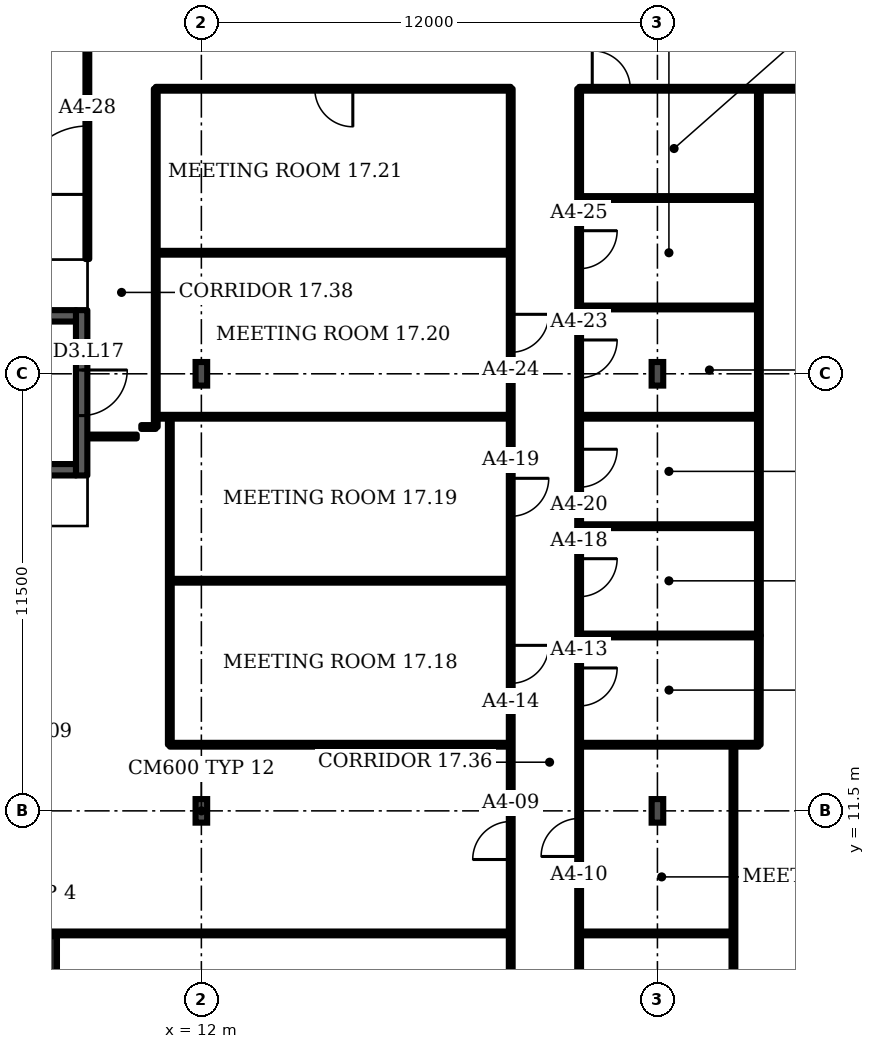
"""IFC4 building model, lengths in metres.
Left out: names, types, materials, properties, quantities, classifications, styles, units other than length and angle.
Written with IfcOpenShell. Run it as: python <this file> out.ifc"""

import sys

from ifc_helpers import new_model, si_unit, direction, frame, frame_2d, origin, origin_2d, place, context, subcontext, project, spatial, rectangle, i_section, extrude, element, fill, save


model = new_model("IFC4")
c1 = context("Model", 3, precision=1e-05, world=origin(), true_north=direction((0.0, 1.0)))
c2 = subcontext(c1, "Body", "Model", "MODEL_VIEW")
j1 = project(units=[si_unit("LENGTHUNIT", "METRE"), si_unit("PLANEANGLEUNIT", "RADIAN")], contexts=[c1])
p1 = place(None, origin())
s1 = spatial("IfcSite", under=j1, at=p1, CompositionType="ELEMENT")
p2 = place(p1, origin())
s2 = spatial("IfcBuilding", under=s1, at=p2, CompositionType="ELEMENT")
p3 = place(p2, frame((0.0, 0.0, 81.1)))
s3 = spatial("IfcBuildingStorey", under=s2, at=p3, CompositionType="ELEMENT", Elevation=81.1)
p4 = place(p3, frame((7.1, 7.1, 0.0), z_axis=(0.0, 0.0, 1.0), x_axis=(1.0, 0.0, 0.0)))
e1 = element("IfcColumn", 1, at=p4, inside=s3, PredefinedType="COLUMN", context=c2, shape_type="SweptSolid", body=[
    extrude(rectangle(XDim=2.2, YDim=2.2, at=origin_2d()), origin(), (0.0, 0.0, 1.0), 3.6),
])
for number, where, z_axis, x_axis in (
    (2, (12.0, 11.5, 0.0), (0.0, 0.0, 1.0), (1.0, 0.0, 0.0)),
    (3, (24.0, 11.5, 0.0), (0.0, 0.0, 1.0), (1.0, 0.0, 0.0)),
    (4, (12.0, 23.0, 0.0), (0.0, 0.0, 1.0), (1.0, 0.0, 0.0)),
    (5, (24.0, 23.0, 0.0), (0.0, 0.0, 1.0), (1.0, 0.0, 0.0)),
):
    element("IfcColumn", number, at=place(p3, frame(where, z_axis=z_axis, x_axis=x_axis)), inside=s3, PredefinedType="COLUMN", context=c2, shape_type="SweptSolid", body=[
        extrude(i_section(OverallWidth=0.305, OverallDepth=0.62, WebThickness=0.021, FlangeThickness=0.04, FilletRadius=0.027, at=origin_2d()), origin(), (0.0, 0.0, 1.0), 3.6),
    ])
p5 = place(p3, frame((8.85, 20.325, 0.0), z_axis=(0.0, 0.0, 1.0), x_axis=(0.0, 1.0, 0.0)))
e6 = element("IfcWall", 6, at=p5, inside=s3, PredefinedType="SHEAR", context=c2, shape_type="SweptSolid", body=[
    extrude(rectangle(XDim=4.35, YDim=0.3, at=frame_2d((2.175, 0.0))), origin(), (0.0, 0.0, 1.0), 3.2),
])
p6 = place(p5, frame((1.575, 0.0, 0.0)))
e7 = element("IfcOpeningElement", 7, at=p6, cuts=e6, PredefinedType="OPENING", context=c2, shape_type="SweptSolid", body=[
    extrude(rectangle(XDim=1.2, YDim=2.1, at=frame_2d((0.6, 1.05))), frame((0.0, 0.16, 0.0), z_axis=(0.0, -1.0, 0.0), x_axis=(1.0, 0.0, 0.0)), (0.0, 0.0, 1.0), 0.32),
])
p7 = place(p3, frame((6.0, 8.275, 0.0), z_axis=(0.0, 0.0, 1.0), x_axis=(1.0, 0.0, 0.0)))
e8 = element("IfcWall", 8, at=p7, inside=s3, PredefinedType="PARTITIONING", context=c2, shape_type="SweptSolid", body=[
    extrude(rectangle(XDim=14.14, YDim=0.1, at=frame_2d((7.07, 0.0))), origin(), (0.0, 0.0, 1.0), 3.2),
])
p8 = place(p3, frame((9.0, 26.02, 0.0), z_axis=(0.0, 0.0, 1.0), x_axis=(0.0, 1.0, 0.0)))
e9 = element("IfcWall", 9, at=p8, inside=s3, PredefinedType="PARTITIONING", context=c2, shape_type="SweptSolid", body=[
    extrude(rectangle(XDim=7.96, YDim=0.1, at=frame_2d((3.98, 0.0))), origin(), (0.0, 0.0, 1.0), 3.2),
])
p9 = place(p8, frame((1.7, 0.0, 0.0)))
e10 = element("IfcOpeningElement", 10, at=p9, cuts=e9, PredefinedType="OPENING", context=c2, shape_type="SweptSolid", body=[
    extrude(rectangle(XDim=1.8, YDim=2.1, at=frame_2d((0.9, 1.05))), frame((0.0, 0.06, 0.0), z_axis=(0.0, -1.0, 0.0), x_axis=(1.0, 0.0, 0.0)), (0.0, 0.0, 1.0), 0.12),
])
p10 = place(p3, frame((9.02, 21.35, 0.0), z_axis=(0.0, 0.0, 1.0), x_axis=(1.0, 0.0, 0.0)))
e11 = element("IfcWall", 11, at=p10, inside=s3, PredefinedType="PARTITIONING", context=c2, shape_type="SweptSolid", body=[
    extrude(rectangle(XDim=1.28, YDim=0.1, at=frame_2d((0.64, 0.0))), origin(), (0.0, 0.0, 1.0), 3.2),
])
p11 = place(p3, frame((10.42, 21.6, 0.0), z_axis=(0.0, 0.0, 1.0), x_axis=(1.0, 0.0, 0.0)))
e12 = element("IfcWall", 12, at=p11, inside=s3, PredefinedType="PARTITIONING", context=c2, shape_type="SweptSolid", body=[
    extrude(rectangle(XDim=0.38, YDim=0.1, at=frame_2d((0.19, 0.0))), origin(), (0.0, 0.0, 1.0), 3.2),
])
p12 = place(p3, frame((10.8, 21.6, 0.0), z_axis=(0.0, 0.0, 1.0), x_axis=(0.0, 1.0, 0.0)))
e13 = element("IfcWall", 13, at=p12, inside=s3, PredefinedType="PARTITIONING", context=c2, shape_type="SweptSolid", body=[
    extrude(rectangle(XDim=8.9, YDim=0.1, at=frame_2d((4.45, 0.0))), origin(), (0.0, 0.0, 1.0), 3.2),
])
for number, where, z_axis, x_axis in (
    (14, (10.8, 21.87, 0.0), (0.0, 0.0, 1.0), (1.0, 0.0, 0.0)),
    (15, (10.8, 26.185, 0.0), (0.0, 0.0, 1.0), (1.0, 0.0, 0.0)),
):
    element("IfcWall", number, at=place(p3, frame(where, z_axis=z_axis, x_axis=x_axis)), inside=s3, PredefinedType="PARTITIONING", context=c2, shape_type="SweptSolid", body=[
        extrude(rectangle(XDim=9.34, YDim=0.1, at=frame_2d((4.67, 0.0))), origin(), (0.0, 0.0, 1.0), 3.2),
    ])
p13 = place(p3, frame((10.8, 30.5, 0.0), z_axis=(0.0, 0.0, 1.0), x_axis=(1.0, 0.0, 0.0)))
e16 = element("IfcWall", 16, at=p13, inside=s3, PredefinedType="PARTITIONING", context=c2, shape_type="SweptSolid", body=[
    extrude(rectangle(XDim=9.34, YDim=0.1, at=frame_2d((4.67, 0.0))), origin(), (0.0, 0.0, 1.0), 3.2),
])
p14 = place(p13, frame((4.185, 0.0, 0.0)))
e17 = element("IfcOpeningElement", 17, at=p14, cuts=e16, PredefinedType="OPENING", context=c2, shape_type="SweptSolid", body=[
    extrude(rectangle(XDim=1.0, YDim=2.1, at=frame_2d((0.5, 1.05))), frame((0.0, 0.06, 0.0), z_axis=(0.0, -1.0, 0.0), x_axis=(1.0, 0.0, 0.0)), (0.0, 0.0, 1.0), 0.12),
])
p15 = place(p3, frame((11.17, 13.24, 0.0), z_axis=(0.0, 0.0, 1.0), x_axis=(0.0, 1.0, 0.0)))
e18 = element("IfcWall", 18, at=p15, inside=s3, PredefinedType="PARTITIONING", context=c2, shape_type="SweptSolid", body=[
    extrude(rectangle(XDim=8.63, YDim=0.1, at=frame_2d((4.315, 0.0))), origin(), (0.0, 0.0, 1.0), 3.2),
])
for number, where, z_axis, x_axis in (
    (19, (11.17, 13.24, 0.0), (0.0, 0.0, 1.0), (1.0, 0.0, 0.0)),
    (20, (11.17, 17.555, 0.0), (0.0, 0.0, 1.0), (1.0, 0.0, 0.0)),
):
    element("IfcWall", number, at=place(p3, frame(where, z_axis=z_axis, x_axis=x_axis)), inside=s3, PredefinedType="PARTITIONING", context=c2, shape_type="SweptSolid", body=[
        extrude(rectangle(XDim=8.97, YDim=0.1, at=frame_2d((4.485, 0.0))), origin(), (0.0, 0.0, 1.0), 3.2),
    ])
p16 = place(p3, frame((20.14, -1.13, 0.0), z_axis=(0.0, 0.0, 1.0), x_axis=(0.0, 1.0, 0.0)))
e21 = element("IfcWall", 21, at=p16, inside=s3, PredefinedType="PARTITIONING", context=c2, shape_type="SweptSolid", body=[
    extrude(rectangle(XDim=31.63, YDim=0.1, at=frame_2d((15.815, 0.0))), origin(), (0.0, 0.0, 1.0), 3.2),
])
p17 = place(p16, frame((1.825, 0.0, 0.0)))
e22 = element("IfcOpeningElement", 22, at=p17, cuts=e21, PredefinedType="OPENING", context=c2, shape_type="SweptSolid", body=[
    extrude(rectangle(XDim=1.0, YDim=2.1, at=frame_2d((0.5, 1.05))), frame((0.0, 0.06, 0.0), z_axis=(0.0, -1.0, 0.0), x_axis=(1.0, 0.0, 0.0)), (0.0, 0.0, 1.0), 0.12),
])
p18 = place(p16, frame((6.305, 0.0, 0.0)))
e23 = element("IfcOpeningElement", 23, at=p18, cuts=e21, PredefinedType="OPENING", context=c2, shape_type="SweptSolid", body=[
    extrude(rectangle(XDim=1.0, YDim=2.1, at=frame_2d((0.5, 1.05))), frame((0.0, 0.06, 0.0), z_axis=(0.0, -1.0, 0.0), x_axis=(1.0, 0.0, 0.0)), (0.0, 0.0, 1.0), 0.12),
])
p19 = place(p16, frame((11.35, 0.0, 0.0)))
e24 = element("IfcOpeningElement", 24, at=p19, cuts=e21, PredefinedType="OPENING", context=c2, shape_type="SweptSolid", body=[
    extrude(rectangle(XDim=1.0, YDim=2.1, at=frame_2d((0.5, 1.05))), frame((0.0, 0.06, 0.0), z_axis=(0.0, -1.0, 0.0), x_axis=(1.0, 0.0, 0.0)), (0.0, 0.0, 1.0), 0.12),
])
p20 = place(p16, frame((15.985, 0.0, 0.0)))
e25 = element("IfcOpeningElement", 25, at=p20, cuts=e21, PredefinedType="OPENING", context=c2, shape_type="SweptSolid", body=[
    extrude(rectangle(XDim=1.0, YDim=2.1, at=frame_2d((0.5, 1.05))), frame((0.0, 0.06, 0.0), z_axis=(0.0, -1.0, 0.0), x_axis=(1.0, 0.0, 0.0)), (0.0, 0.0, 1.0), 0.12),
])
p21 = place(p16, frame((20.38, 0.0, 0.0)))
e26 = element("IfcOpeningElement", 26, at=p21, cuts=e21, PredefinedType="OPENING", context=c2, shape_type="SweptSolid", body=[
    extrude(rectangle(XDim=1.0, YDim=2.1, at=frame_2d((0.5, 1.05))), frame((0.0, 0.06, 0.0), z_axis=(0.0, -1.0, 0.0), x_axis=(1.0, 0.0, 0.0)), (0.0, 0.0, 1.0), 0.12),
])
p22 = place(p16, frame((24.695, 0.0, 0.0)))
e27 = element("IfcOpeningElement", 27, at=p22, cuts=e21, PredefinedType="OPENING", context=c2, shape_type="SweptSolid", body=[
    extrude(rectangle(XDim=1.0, YDim=2.1, at=frame_2d((0.5, 1.05))), frame((0.0, 0.06, 0.0), z_axis=(0.0, -1.0, 0.0), x_axis=(1.0, 0.0, 0.0)), (0.0, 0.0, 1.0), 0.12),
])
p23 = place(p3, frame((21.94, -1.29, 0.0), z_axis=(0.0, 0.0, 1.0), x_axis=(0.0, 1.0, 0.0)))
e28 = element("IfcWall", 28, at=p23, inside=s3, PredefinedType="PARTITIONING", context=c2, shape_type="SweptSolid", body=[
    extrude(rectangle(XDim=31.79, YDim=0.1, at=frame_2d((15.895, 0.0))), origin(), (0.0, 0.0, 1.0), 3.2),
])
p24 = place(p23, frame((1.82, 0.0, 0.0)))
e29 = element("IfcOpeningElement", 29, at=p24, cuts=e28, PredefinedType="OPENING", context=c2, shape_type="SweptSolid", body=[
    extrude(rectangle(XDim=1.0, YDim=2.1, at=frame_2d((0.5, 1.05))), frame((0.0, 0.06, 0.0), z_axis=(0.0, -1.0, 0.0), x_axis=(1.0, 0.0, 0.0)), (0.0, 0.0, 1.0), 0.12),
])
p25 = place(p23, frame((6.63, 0.0, 0.0)))
e30 = element("IfcOpeningElement", 30, at=p25, cuts=e28, PredefinedType="OPENING", context=c2, shape_type="SweptSolid", body=[
    extrude(rectangle(XDim=1.0, YDim=2.1, at=frame_2d((0.5, 1.05))), frame((0.0, 0.06, 0.0), z_axis=(0.0, -1.0, 0.0), x_axis=(1.0, 0.0, 0.0)), (0.0, 0.0, 1.0), 0.12),
])
p26 = place(p23, frame((11.59, 0.0, 0.0)))
e31 = element("IfcOpeningElement", 31, at=p26, cuts=e28, PredefinedType="OPENING", context=c2, shape_type="SweptSolid", body=[
    extrude(rectangle(XDim=1.0, YDim=2.1, at=frame_2d((0.5, 1.05))), frame((0.0, 0.06, 0.0), z_axis=(0.0, -1.0, 0.0), x_axis=(1.0, 0.0, 0.0)), (0.0, 0.0, 1.0), 0.12),
])
p27 = place(p23, frame((15.55, 0.0, 0.0)))
e32 = element("IfcOpeningElement", 32, at=p27, cuts=e28, PredefinedType="OPENING", context=c2, shape_type="SweptSolid", body=[
    extrude(rectangle(XDim=1.0, YDim=2.1, at=frame_2d((0.5, 1.05))), frame((0.0, 0.06, 0.0), z_axis=(0.0, -1.0, 0.0), x_axis=(1.0, 0.0, 0.0)), (0.0, 0.0, 1.0), 0.12),
])
p28 = place(p23, frame((18.425, 0.0, 0.0)))
e33 = element("IfcOpeningElement", 33, at=p28, cuts=e28, PredefinedType="OPENING", context=c2, shape_type="SweptSolid", body=[
    extrude(rectangle(XDim=1.0, YDim=2.1, at=frame_2d((0.5, 1.05))), frame((0.0, 0.06, 0.0), z_axis=(0.0, -1.0, 0.0), x_axis=(1.0, 0.0, 0.0)), (0.0, 0.0, 1.0), 0.12),
])
p29 = place(p23, frame((21.305, 0.0, 0.0)))
e34 = element("IfcOpeningElement", 34, at=p29, cuts=e28, PredefinedType="OPENING", context=c2, shape_type="SweptSolid", body=[
    extrude(rectangle(XDim=1.0, YDim=2.1, at=frame_2d((0.5, 1.05))), frame((0.0, 0.06, 0.0), z_axis=(0.0, -1.0, 0.0), x_axis=(1.0, 0.0, 0.0)), (0.0, 0.0, 1.0), 0.12),
])
p30 = place(p23, frame((24.18, 0.0, 0.0)))
e35 = element("IfcOpeningElement", 35, at=p30, cuts=e28, PredefinedType="OPENING", context=c2, shape_type="SweptSolid", body=[
    extrude(rectangle(XDim=1.0, YDim=2.1, at=frame_2d((0.5, 1.05))), frame((0.0, 0.06, 0.0), z_axis=(0.0, -1.0, 0.0), x_axis=(1.0, 0.0, 0.0)), (0.0, 0.0, 1.0), 0.12),
])
p31 = place(p23, frame((27.055, 0.0, 0.0)))
e36 = element("IfcOpeningElement", 36, at=p31, cuts=e28, PredefinedType="OPENING", context=c2, shape_type="SweptSolid", body=[
    extrude(rectangle(XDim=1.0, YDim=2.1, at=frame_2d((0.5, 1.05))), frame((0.0, 0.06, 0.0), z_axis=(0.0, -1.0, 0.0), x_axis=(1.0, 0.0, 0.0)), (0.0, 0.0, 1.0), 0.12),
])
p32 = place(p3, frame((21.94, 8.275, 0.0), z_axis=(0.0, 0.0, 1.0), x_axis=(1.0, 0.0, 0.0)))
e37 = element("IfcWall", 37, at=p32, inside=s3, PredefinedType="PARTITIONING", context=c2, shape_type="SweptSolid", body=[
    extrude(rectangle(XDim=4.06, YDim=0.1, at=frame_2d((2.03, 0.0))), origin(), (0.0, 0.0, 1.0), 3.2),
])
for number, where, z_axis, x_axis in (
    (38, (21.94, 13.24, 0.0), (0.0, 0.0, 1.0), (1.0, 0.0, 0.0)),
    (39, (21.94, 16.115, 0.0), (0.0, 0.0, 1.0), (1.0, 0.0, 0.0)),
    (40, (21.94, 18.99, 0.0), (0.0, 0.0, 1.0), (1.0, 0.0, 0.0)),
    (41, (21.94, 21.87, 0.0), (0.0, 0.0, 1.0), (1.0, 0.0, 0.0)),
    (42, (21.94, 24.745, 0.0), (0.0, 0.0, 1.0), (1.0, 0.0, 0.0)),
    (43, (21.94, 27.625, 0.0), (0.0, 0.0, 1.0), (1.0, 0.0, 0.0)),
):
    element("IfcWall", number, at=place(p3, frame(where, z_axis=z_axis, x_axis=x_axis)), inside=s3, PredefinedType="PARTITIONING", context=c2, shape_type="SweptSolid", body=[
        extrude(rectangle(XDim=4.725, YDim=0.1, at=frame_2d((2.363, 0.0))), origin(), (0.0, 0.0, 1.0), 3.2),
    ])
p33 = place(p3, frame((21.94, 30.5, 0.0), z_axis=(0.0, 0.0, 1.0), x_axis=(1.0, 0.0, 0.0)))
e44 = element("IfcWall", 44, at=p33, inside=s3, PredefinedType="PARTITIONING", context=c2, shape_type="SweptSolid", body=[
    extrude(rectangle(XDim=14.91, YDim=0.1, at=frame_2d((7.455, 0.0))), origin(), (0.0, 0.0, 1.0), 3.2),
])
p34 = place(p33, frame((0.345, 0.0, 0.0)))
e45 = element("IfcOpeningElement", 45, at=p34, cuts=e44, PredefinedType="OPENING", context=c2, shape_type="SweptSolid", body=[
    extrude(rectangle(XDim=1.0, YDim=2.1, at=frame_2d((0.5, 1.05))), frame((0.0, 0.06, 0.0), z_axis=(0.0, -1.0, 0.0), x_axis=(1.0, 0.0, 0.0)), (0.0, 0.0, 1.0), 0.12),
])
p35 = place(p33, frame((8.95, 0.0, 0.0)))
e46 = element("IfcOpeningElement", 46, at=p35, cuts=e44, PredefinedType="OPENING", context=c2, shape_type="SweptSolid", body=[
    extrude(rectangle(XDim=1.8, YDim=2.1, at=frame_2d((0.9, 1.05))), frame((0.0, 0.06, 0.0), z_axis=(0.0, -1.0, 0.0), x_axis=(1.0, 0.0, 0.0)), (0.0, 0.0, 1.0), 0.12),
])
p36 = place(p3, frame((26.0, -1.645, 0.0), z_axis=(0.0, 0.0, 1.0), x_axis=(0.0, 1.0, 0.0)))
e47 = element("IfcWall", 47, at=p36, inside=s3, PredefinedType="PARTITIONING", context=c2, shape_type="SweptSolid", body=[
    extrude(rectangle(XDim=14.885, YDim=0.1, at=frame_2d((7.442, 0.0))), origin(), (0.0, 0.0, 1.0), 3.2),
])
p37 = place(p3, frame((26.665, 13.24, 0.0), z_axis=(0.0, 0.0, 1.0), x_axis=(0.001698, 0.999995, 0.0)))
e48 = element("IfcWall", 48, at=p37, inside=s3, PredefinedType="PARTITIONING", context=c2, shape_type="SweptSolid", body=[
    extrude(rectangle(XDim=2.875, YDim=0.1, at=frame_2d((1.438, 0.0))), origin(), (0.0, 0.0, 1.0), 3.2),
])
p38 = place(p3, frame((26.67, 16.115, 0.0), z_axis=(0.0, 0.0, 1.0), x_axis=(0.0, 1.0, 0.0)))
e49 = element("IfcWall", 49, at=p38, inside=s3, PredefinedType="PARTITIONING", context=c2, shape_type="SweptSolid", body=[
    extrude(rectangle(XDim=14.385, YDim=0.1, at=frame_2d((7.192, 0.0))), origin(), (0.0, 0.0, 1.0), 3.2),
])
for number, where, z_axis, x_axis in (
    (50, (1.2, 20.475, 0.0), (0.0, 0.0, 1.0), (1.0, 0.0, 0.0)),
    (51, (1.2, 24.525, 0.0), (0.0, 0.0, 1.0), (1.0, 0.0, 0.0)),
):
    element("IfcWall", number, at=place(p3, frame(where, z_axis=z_axis, x_axis=x_axis)), inside=s3, PredefinedType="SHEAR", context=c2, shape_type="SweptSolid", body=[
        extrude(rectangle(XDim=7.5, YDim=0.3, at=frame_2d((3.75, 0.0))), origin(), (0.0, 0.0, 1.0), 3.2),
    ])
p39 = place(p6, origin())
e52 = element("IfcDoor", 52, at=p39, inside=s3, OperationType="SINGLE_SWING_RIGHT", PredefinedType="DOOR", context=c2, shape_type="SweptSolid", body=[
    extrude(rectangle(XDim=1.2, YDim=2.1, at=frame_2d((0.6, 1.05))), frame((0.0, 0.025, 0.0), z_axis=(0.0, -1.0, 0.0), x_axis=(1.0, 0.0, 0.0)), (0.0, 0.0, 1.0), 0.05),
])
fill(e7, e52)
p40 = place(p19, origin())
e53 = element("IfcDoor", 53, at=p40, inside=s3, OperationType="SINGLE_SWING_LEFT", PredefinedType="DOOR", context=c2, shape_type="SweptSolid", body=[
    extrude(rectangle(XDim=1.0, YDim=2.1, at=frame_2d((0.5, 1.05))), frame((0.0, 0.025, 0.0), z_axis=(0.0, -1.0, 0.0), x_axis=(1.0, 0.0, 0.0)), (0.0, 0.0, 1.0), 0.05),
])
fill(e24, e53)
p41 = place(p26, origin())
e54 = element("IfcDoor", 54, at=p41, inside=s3, OperationType="SINGLE_SWING_LEFT", PredefinedType="DOOR", context=c2, shape_type="SweptSolid", body=[
    extrude(rectangle(XDim=1.0, YDim=2.1, at=frame_2d((0.5, 1.05))), frame((0.0, 0.025, 0.0), z_axis=(0.0, -1.0, 0.0), x_axis=(1.0, 0.0, 0.0)), (0.0, 0.0, 1.0), 0.05),
])
fill(e31, e54)
p42 = place(p27, origin())
e55 = element("IfcDoor", 55, at=p42, inside=s3, OperationType="SINGLE_SWING_RIGHT", PredefinedType="DOOR", context=c2, shape_type="SweptSolid", body=[
    extrude(rectangle(XDim=1.0, YDim=2.1, at=frame_2d((0.5, 1.05))), frame((0.0, 0.025, 0.0), z_axis=(0.0, -1.0, 0.0), x_axis=(1.0, 0.0, 0.0)), (0.0, 0.0, 1.0), 0.05),
])
fill(e32, e55)
p43 = place(p20, origin())
e56 = element("IfcDoor", 56, at=p43, inside=s3, OperationType="SINGLE_SWING_RIGHT", PredefinedType="DOOR", context=c2, shape_type="SweptSolid", body=[
    extrude(rectangle(XDim=1.0, YDim=2.1, at=frame_2d((0.5, 1.05))), frame((0.0, 0.025, 0.0), z_axis=(0.0, -1.0, 0.0), x_axis=(1.0, 0.0, 0.0)), (0.0, 0.0, 1.0), 0.05),
])
fill(e25, e56)
p44 = place(p28, origin())
e57 = element("IfcDoor", 57, at=p44, inside=s3, OperationType="SINGLE_SWING_RIGHT", PredefinedType="DOOR", context=c2, shape_type="SweptSolid", body=[
    extrude(rectangle(XDim=1.0, YDim=2.1, at=frame_2d((0.5, 1.05))), frame((0.0, 0.025, 0.0), z_axis=(0.0, -1.0, 0.0), x_axis=(1.0, 0.0, 0.0)), (0.0, 0.0, 1.0), 0.05),
])
fill(e33, e57)
p45 = place(p21, origin())
e58 = element("IfcDoor", 58, at=p45, inside=s3, OperationType="SINGLE_SWING_RIGHT", PredefinedType="DOOR", context=c2, shape_type="SweptSolid", body=[
    extrude(rectangle(XDim=1.0, YDim=2.1, at=frame_2d((0.5, 1.05))), frame((0.0, 0.025, 0.0), z_axis=(0.0, -1.0, 0.0), x_axis=(1.0, 0.0, 0.0)), (0.0, 0.0, 1.0), 0.05),
])
fill(e26, e58)
p46 = place(p29, origin())
e59 = element("IfcDoor", 59, at=p46, inside=s3, OperationType="SINGLE_SWING_RIGHT", PredefinedType="DOOR", context=c2, shape_type="SweptSolid", body=[
    extrude(rectangle(XDim=1.0, YDim=2.1, at=frame_2d((0.5, 1.05))), frame((0.0, 0.025, 0.0), z_axis=(0.0, -1.0, 0.0), x_axis=(1.0, 0.0, 0.0)), (0.0, 0.0, 1.0), 0.05),
])
fill(e34, e59)
p47 = place(p30, origin())
e60 = element("IfcDoor", 60, at=p47, inside=s3, OperationType="SINGLE_SWING_RIGHT", PredefinedType="DOOR", context=c2, shape_type="SweptSolid", body=[
    extrude(rectangle(XDim=1.0, YDim=2.1, at=frame_2d((0.5, 1.05))), frame((0.0, 0.025, 0.0), z_axis=(0.0, -1.0, 0.0), x_axis=(1.0, 0.0, 0.0)), (0.0, 0.0, 1.0), 0.05),
])
fill(e35, e60)
p48 = place(p22, origin())
e61 = element("IfcDoor", 61, at=p48, inside=s3, OperationType="SINGLE_SWING_RIGHT", PredefinedType="DOOR", context=c2, shape_type="SweptSolid", body=[
    extrude(rectangle(XDim=1.0, YDim=2.1, at=frame_2d((0.5, 1.05))), frame((0.0, 0.025, 0.0), z_axis=(0.0, -1.0, 0.0), x_axis=(1.0, 0.0, 0.0)), (0.0, 0.0, 1.0), 0.05),
])
fill(e27, e61)
p49 = place(p31, origin())
e62 = element("IfcDoor", 62, at=p49, inside=s3, OperationType="SINGLE_SWING_RIGHT", PredefinedType="DOOR", context=c2, shape_type="SweptSolid", body=[
    extrude(rectangle(XDim=1.0, YDim=2.1, at=frame_2d((0.5, 1.05))), frame((0.0, 0.025, 0.0), z_axis=(0.0, -1.0, 0.0), x_axis=(1.0, 0.0, 0.0)), (0.0, 0.0, 1.0), 0.05),
])
fill(e36, e62)
p50 = place(p9, origin())
e63 = element("IfcDoor", 63, at=p50, inside=s3, OperationType="DOUBLE_DOOR_SINGLE_SWING", PredefinedType="DOOR", context=c2, shape_type="SweptSolid", body=[
    extrude(rectangle(XDim=1.8, YDim=2.1, at=frame_2d((0.9, 1.05))), frame((0.0, 0.025, 0.0), z_axis=(0.0, -1.0, 0.0), x_axis=(1.0, 0.0, 0.0)), (0.0, 0.0, 1.0), 0.05),
])
fill(e10, e63)
p51 = place(p14, origin())
e64 = element("IfcDoor", 64, at=p51, inside=s3, OperationType="SINGLE_SWING_RIGHT", PredefinedType="DOOR", context=c2, shape_type="SweptSolid", body=[
    extrude(rectangle(XDim=1.0, YDim=2.1, at=frame_2d((0.5, 1.05))), frame((0.0, 0.025, 0.0), z_axis=(0.0, -1.0, 0.0), x_axis=(1.0, 0.0, 0.0)), (0.0, 0.0, 1.0), 0.05),
])
fill(e17, e64)
p52 = place(p34, origin())
e65 = element("IfcDoor", 65, at=p52, inside=s3, OperationType="SINGLE_SWING_LEFT", PredefinedType="DOOR", context=c2, shape_type="SweptSolid", body=[
    extrude(rectangle(XDim=1.0, YDim=2.1, at=frame_2d((0.5, 1.05))), frame((0.0, 0.025, 0.0), z_axis=(0.0, -1.0, 0.0), x_axis=(1.0, 0.0, 0.0)), (0.0, 0.0, 1.0), 0.05),
])
fill(e45, e65)
save(model, sys.argv[1])
